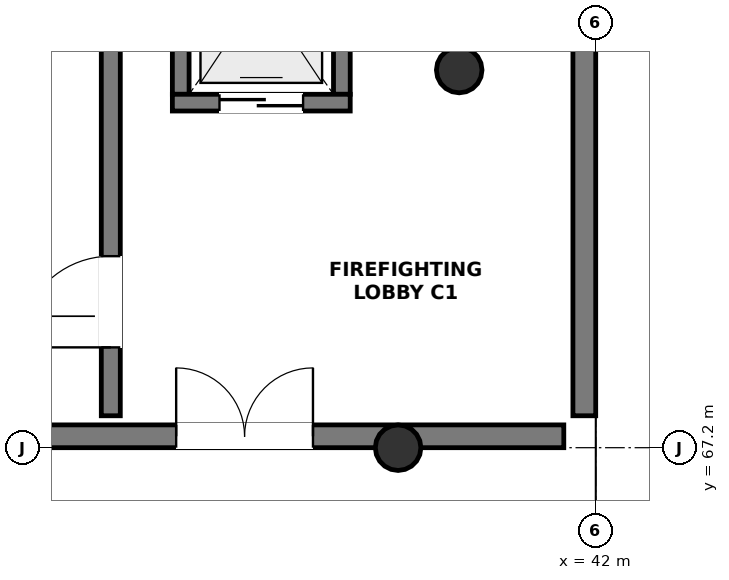
"""IFC4 building model, lengths in metres.
Left out: names, types, materials, properties, quantities, classifications, styles, units other than length and angle.
Written with IfcOpenShell. Run it as: python <this file> out.ifc"""

import sys

from ifc_helpers import new_model, si_unit, direction, frame, frame_2d, origin, origin_2d, place, context, subcontext, project, spatial, rectangle, circle, extrude, element, fill, save


model = new_model("IFC4")
c1 = context("Model", 3, precision=1e-05, world=origin(), true_north=direction((0.0, 1.0)))
c2 = subcontext(c1, "Body", "Model", "MODEL_VIEW")
j1 = project(units=[si_unit("LENGTHUNIT", "METRE"), si_unit("PLANEANGLEUNIT", "RADIAN")], contexts=[c1])
p1 = place(None, origin())
s1 = spatial("IfcSite", under=j1, at=p1, CompositionType="ELEMENT")
p2 = place(p1, origin())
s2 = spatial("IfcBuilding", under=s1, at=p2, CompositionType="ELEMENT")
p3 = place(p2, frame((0.0, 0.0, 14.4)))
s3 = spatial("IfcBuildingStorey", under=s2, at=p3, CompositionType="ELEMENT", Elevation=14.4)
for number, where, z_axis, x_axis in (
    (1, (40.204, 72.169, 0.0), (0.0, 0.0, 1.0), (1.0, 0.0, 0.0)),
    (2, (39.4, 67.2, 0.0), (0.0, 0.0, 1.0), (1.0, 0.0, 0.0)),
):
    element("IfcColumn", number, at=place(p3, frame(where, z_axis=z_axis, x_axis=x_axis)), inside=s3, PredefinedType="COLUMN", context=c2, shape_type="SweptSolid", body=[
        extrude(circle(Radius=0.3, at=origin_2d()), origin(), (0.0, 0.0, 1.0), 3.9),
    ])
p4 = place(p3, frame((25.62, 67.35, 0.0), z_axis=(0.0, 0.0, 1.0), x_axis=(1.0, 0.0, 0.0)))
e3 = element("IfcWall", 3, at=p4, inside=s3, PredefinedType="SHEAR", context=c2, shape_type="SweptSolid", body=[
    extrude(rectangle(XDim=15.96, YDim=0.3, at=frame_2d((7.98, 0.0))), origin(), (0.0, 0.0, 1.0), 3.62),
])
p5 = place(p4, frame((10.86, 0.0, 0.0)))
e4 = element("IfcOpeningElement", 4, at=p5, cuts=e3, PredefinedType="OPENING", context=c2, shape_type="SweptSolid", body=[
    extrude(rectangle(XDim=1.8, YDim=2.2, at=frame_2d((0.9, 1.1))), frame((0.0, 0.162, 0.0), z_axis=(0.0, -1.0, 0.0), x_axis=(1.0, 0.0, 0.0)), (0.0, 0.0, 1.0), 0.324),
])
p6 = place(p3, frame((41.85, 67.62, 0.0), z_axis=(0.0, 0.0, 1.0), x_axis=(0.0, 1.0, 0.0)))
e5 = element("IfcWall", 5, at=p6, inside=s3, PredefinedType="SHEAR", context=c2, shape_type="SweptSolid", body=[
    extrude(rectangle(XDim=7.56, YDim=0.3, at=frame_2d((3.78, 0.0))), origin(), (0.0, 0.0, 1.0), 3.62),
])
p7 = place(p3, frame((35.62, 67.62, 0.0), z_axis=(0.0, 0.0, 1.0), x_axis=(0.0, 1.0, 0.0)))
e6 = element("IfcWall", 6, at=p7, inside=s3, PredefinedType="SHEAR", context=c2, shape_type="SweptSolid", body=[
    extrude(rectangle(XDim=7.56, YDim=0.25, at=frame_2d((3.78, 0.0))), origin(), (0.0, 0.0, 1.0), 3.62),
])
p8 = place(p7, frame((0.9, 0.0, 0.0)))
e7 = element("IfcOpeningElement", 7, at=p8, cuts=e6, PredefinedType="OPENING", context=c2, shape_type="SweptSolid", body=[
    extrude(rectangle(XDim=1.2, YDim=2.2, at=frame_2d((0.6, 1.1))), frame((0.0, 0.137, 0.0), z_axis=(0.0, -1.0, 0.0), x_axis=(1.0, 0.0, 0.0)), (0.0, 0.0, 1.0), 0.274),
])
for number, where, z_axis, x_axis in (
    (8, (36.54, 71.85, 0.0), (0.0, 0.0, 1.0), (0.0, 1.0, 0.0)),
    (9, (38.66, 71.85, 0.0), (0.0, 0.0, 1.0), (0.0, 1.0, 0.0)),
):
    element("IfcWall", number, at=place(p3, frame(where, z_axis=z_axis, x_axis=x_axis)), inside=s3, PredefinedType="SOLIDWALL", context=c2, shape_type="SweptSolid", body=[
        extrude(rectangle(XDim=2.7, YDim=0.22, at=frame_2d((1.35, 0.0))), origin(), (0.0, 0.0, 1.0), 3.62),
    ])
p9 = place(p3, frame((36.43, 71.74, 0.0), z_axis=(0.0, 0.0, 1.0), x_axis=(1.0, 0.0, 0.0)))
e10 = element("IfcWall", 10, at=p9, inside=s3, PredefinedType="SOLIDWALL", context=c2, shape_type="SweptSolid", body=[
    extrude(rectangle(XDim=2.34, YDim=0.22, at=frame_2d((1.17, 0.0))), origin(), (0.0, 0.0, 1.0), 3.62),
])
p10 = place(p9, frame((0.62, 0.0, 0.0)))
e11 = element("IfcOpeningElement", 11, at=p10, cuts=e10, PredefinedType="OPENING", context=c2, shape_type="SweptSolid", body=[
    extrude(rectangle(XDim=1.1, YDim=2.15, at=frame_2d((0.55, 1.075))), frame((0.0, 0.122, 0.0), z_axis=(0.0, -1.0, 0.0), x_axis=(1.0, 0.0, 0.0)), (0.0, 0.0, 1.0), 0.244),
])
p11 = place(p5, origin())
e12 = element("IfcDoor", 12, at=p11, inside=s3, OperationType="DOUBLE_DOOR_SINGLE_SWING", PredefinedType="DOOR", context=c2, shape_type="SweptSolid", body=[
    extrude(rectangle(XDim=1.8, YDim=2.2, at=frame_2d((0.9, 1.1))), frame((0.0, 0.025, 0.0), z_axis=(0.0, -1.0, 0.0), x_axis=(1.0, 0.0, 0.0)), (0.0, 0.0, 1.0), 0.05),
])
fill(e4, e12)
p12 = place(p8, origin())
e13 = element("IfcDoor", 13, at=p12, inside=s3, OperationType="SINGLE_SWING_LEFT", PredefinedType="DOOR", context=c2, shape_type="SweptSolid", body=[
    extrude(rectangle(XDim=1.2, YDim=2.2, at=frame_2d((0.6, 1.1))), frame((0.0, 0.025, 0.0), z_axis=(0.0, -1.0, 0.0), x_axis=(1.0, 0.0, 0.0)), (0.0, 0.0, 1.0), 0.05),
])
fill(e7, e13)
p13 = place(p10, origin())
e14 = element("IfcDoor", 14, at=p13, inside=s3, OperationType="DOUBLE_DOOR_SLIDING", PredefinedType="DOOR", context=c2, shape_type="SweptSolid", body=[
    extrude(rectangle(XDim=1.1, YDim=2.15, at=frame_2d((0.55, 1.075))), frame((0.0, 0.025, 0.0), z_axis=(0.0, -1.0, 0.0), x_axis=(1.0, 0.0, 0.0)), (0.0, 0.0, 1.0), 0.05),
])
fill(e11, e14)
save(model, sys.argv[1])
